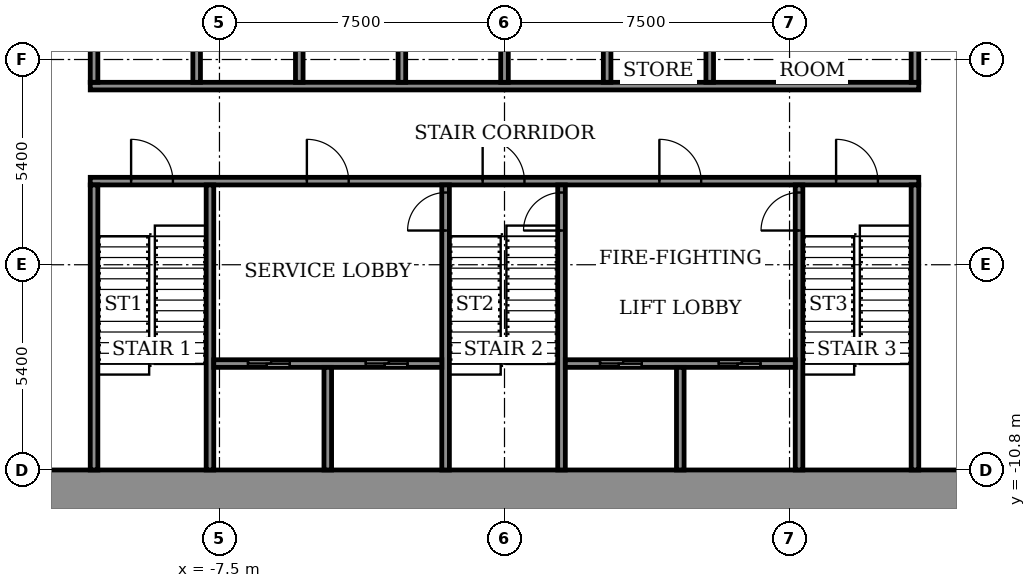
"""IFC4 building model, lengths in metres.
Left out: names, types, materials, properties, quantities, classifications, styles, units other than length and angle.
Written with IfcOpenShell. Run it as: python <this file> out.ifc"""

import sys

from ifc_helpers import new_model, si_unit, direction, frame, frame_2d, origin, place, context, subcontext, project, spatial, rectangle, extrude, element, fill, save


model = new_model("IFC4")
c1 = context("Model", 3, precision=1e-05, world=origin(), true_north=direction((0.0, 1.0)))
c2 = subcontext(c1, "Body", "Model", "MODEL_VIEW")
j1 = project(units=[si_unit("LENGTHUNIT", "METRE"), si_unit("PLANEANGLEUNIT", "RADIAN")], contexts=[c1])
p1 = place(None, origin())
s1 = spatial("IfcSite", under=j1, at=p1, CompositionType="ELEMENT")
p2 = place(p1, origin())
s2 = spatial("IfcBuilding", under=s1, at=p2, CompositionType="ELEMENT")
p3 = place(p2, frame((0.0, 0.0, 25.0)))
s3 = spatial("IfcBuildingStorey", under=s2, at=p3, CompositionType="ELEMENT", Elevation=25.0)
p4 = place(p3, frame((-15.0, -11.4, 0.0), z_axis=(0.0, 0.0, 1.0), x_axis=(1.0, 0.0, 0.0)))
e1 = element("IfcWall", 1, at=p4, inside=s3, PredefinedType="SHEAR", context=c2, shape_type="SweptSolid", body=[
    extrude(rectangle(XDim=30.0, YDim=1.2, at=frame_2d((15.0, 0.0))), origin(), (0.0, 0.0, 1.0), 4.5),
])
p5 = place(p3, frame((-10.9, -3.2, 0.0), z_axis=(0.0, 0.0, 1.0), x_axis=(1.0, 0.0, 0.0)))
e2 = element("IfcWall", 2, at=p5, inside=s3, PredefinedType="SHEAR", context=c2, shape_type="SweptSolid", body=[
    extrude(rectangle(XDim=21.8, YDim=0.2, at=frame_2d((10.9, 0.0))), origin(), (0.0, 0.0, 1.0), 3.95),
])
p6 = place(p5, frame((1.075, 0.0, 0.0)))
e3 = element("IfcOpeningElement", 3, at=p6, cuts=e2, PredefinedType="OPENING", context=c2, shape_type="SweptSolid", body=[
    extrude(rectangle(XDim=1.1, YDim=2.1, at=frame_2d((0.55, 1.05))), frame((0.0, 0.11, 0.0), z_axis=(0.0, -1.0, 0.0), x_axis=(1.0, 0.0, 0.0)), (0.0, 0.0, 1.0), 0.22),
])
p7 = place(p5, frame((10.325, 0.0, 0.0)))
e4 = element("IfcOpeningElement", 4, at=p7, cuts=e2, PredefinedType="OPENING", context=c2, shape_type="SweptSolid", body=[
    extrude(rectangle(XDim=1.1, YDim=2.1, at=frame_2d((0.55, 1.05))), frame((0.0, 0.11, 0.0), z_axis=(0.0, -1.0, 0.0), x_axis=(1.0, 0.0, 0.0)), (0.0, 0.0, 1.0), 0.22),
])
p8 = place(p5, frame((19.625, 0.0, 0.0)))
e5 = element("IfcOpeningElement", 5, at=p8, cuts=e2, PredefinedType="OPENING", context=c2, shape_type="SweptSolid", body=[
    extrude(rectangle(XDim=1.1, YDim=2.1, at=frame_2d((0.55, 1.05))), frame((0.0, 0.11, 0.0), z_axis=(0.0, -1.0, 0.0), x_axis=(1.0, 0.0, 0.0)), (0.0, 0.0, 1.0), 0.22),
])
p9 = place(p5, frame((5.7, 0.0, 0.0)))
e6 = element("IfcOpeningElement", 6, at=p9, cuts=e2, PredefinedType="OPENING", context=c2, shape_type="SweptSolid", body=[
    extrude(rectangle(XDim=1.1, YDim=2.1, at=frame_2d((0.55, 1.05))), frame((0.0, 0.11, 0.0), z_axis=(0.0, -1.0, 0.0), x_axis=(1.0, 0.0, 0.0)), (0.0, 0.0, 1.0), 0.22),
])
p10 = place(p5, frame((14.975, 0.0, 0.0)))
e7 = element("IfcOpeningElement", 7, at=p10, cuts=e2, PredefinedType="OPENING", context=c2, shape_type="SweptSolid", body=[
    extrude(rectangle(XDim=1.1, YDim=2.1, at=frame_2d((0.55, 1.05))), frame((0.0, 0.11, 0.0), z_axis=(0.0, -1.0, 0.0), x_axis=(1.0, 0.0, 0.0)), (0.0, 0.0, 1.0), 0.22),
])
p11 = place(p3, frame((-10.9, -0.7, 0.0), z_axis=(0.0, 0.0, 1.0), x_axis=(1.0, 0.0, 0.0)))
e8 = element("IfcWall", 8, at=p11, inside=s3, PredefinedType="SHEAR", context=c2, shape_type="SweptSolid", body=[
    extrude(rectangle(XDim=21.8, YDim=0.2, at=frame_2d((10.9, 0.0))), origin(), (0.0, 0.0, 1.0), 3.95),
])
for number, where, z_axis, x_axis in (
    (9, (-10.8, -10.8, 0.0), (0.0, 0.0, 1.0), (0.0, 1.0, 0.0)),
    (10, (-7.75, -10.8, 0.0), (0.0, 0.0, 1.0), (0.0, 1.0, 0.0)),
):
    element("IfcWall", number, at=place(p3, frame(where, z_axis=z_axis, x_axis=x_axis)), inside=s3, PredefinedType="SHEAR", context=c2, shape_type="SweptSolid", body=[
        extrude(rectangle(XDim=7.5, YDim=0.2, at=frame_2d((3.75, 0.0))), origin(), (0.0, 0.0, 1.0), 3.95),
    ])
p12 = place(p3, frame((-1.55, -10.8, 0.0), z_axis=(0.0, 0.0, 1.0), x_axis=(0.0, 1.0, 0.0)))
e11 = element("IfcWall", 11, at=p12, inside=s3, PredefinedType="SHEAR", context=c2, shape_type="SweptSolid", body=[
    extrude(rectangle(XDim=7.5, YDim=0.2, at=frame_2d((3.75, 0.0))), origin(), (0.0, 0.0, 1.0), 3.95),
])
p13 = place(p12, frame((6.3, 0.0, 0.0)))
e12 = element("IfcOpeningElement", 12, at=p13, cuts=e11, PredefinedType="OPENING", context=c2, shape_type="SweptSolid", body=[
    extrude(rectangle(XDim=1.0, YDim=2.1, at=frame_2d((0.5, 1.05))), frame((0.0, 0.11, 0.0), z_axis=(0.0, -1.0, 0.0), x_axis=(1.0, 0.0, 0.0)), (0.0, 0.0, 1.0), 0.22),
])
p14 = place(p3, frame((1.5, -10.8, 0.0), z_axis=(0.0, 0.0, 1.0), x_axis=(0.0, 1.0, 0.0)))
e13 = element("IfcWall", 13, at=p14, inside=s3, PredefinedType="SHEAR", context=c2, shape_type="SweptSolid", body=[
    extrude(rectangle(XDim=7.5, YDim=0.2, at=frame_2d((3.75, 0.0))), origin(), (0.0, 0.0, 1.0), 3.95),
])
p15 = place(p14, frame((6.3, 0.0, 0.0)))
e14 = element("IfcOpeningElement", 14, at=p15, cuts=e13, PredefinedType="OPENING", context=c2, shape_type="SweptSolid", body=[
    extrude(rectangle(XDim=1.0, YDim=2.1, at=frame_2d((0.5, 1.05))), frame((0.0, 0.11, 0.0), z_axis=(0.0, -1.0, 0.0), x_axis=(1.0, 0.0, 0.0)), (0.0, 0.0, 1.0), 0.22),
])
p16 = place(p3, frame((7.75, -10.8, 0.0), z_axis=(0.0, 0.0, 1.0), x_axis=(0.0, 1.0, 0.0)))
e15 = element("IfcWall", 15, at=p16, inside=s3, PredefinedType="SHEAR", context=c2, shape_type="SweptSolid", body=[
    extrude(rectangle(XDim=7.5, YDim=0.2, at=frame_2d((3.75, 0.0))), origin(), (0.0, 0.0, 1.0), 3.95),
])
p17 = place(p16, frame((6.3, 0.0, 0.0)))
e16 = element("IfcOpeningElement", 16, at=p17, cuts=e15, PredefinedType="OPENING", context=c2, shape_type="SweptSolid", body=[
    extrude(rectangle(XDim=1.0, YDim=2.1, at=frame_2d((0.5, 1.05))), frame((0.0, 0.11, 0.0), z_axis=(0.0, -1.0, 0.0), x_axis=(1.0, 0.0, 0.0)), (0.0, 0.0, 1.0), 0.22),
])
p18 = place(p3, frame((10.8, -10.8, 0.0), z_axis=(0.0, 0.0, 1.0), x_axis=(0.0, 1.0, 0.0)))
e17 = element("IfcWall", 17, at=p18, inside=s3, PredefinedType="SHEAR", context=c2, shape_type="SweptSolid", body=[
    extrude(rectangle(XDim=7.5, YDim=0.2, at=frame_2d((3.75, 0.0))), origin(), (0.0, 0.0, 1.0), 3.95),
])
p19 = place(p3, frame((-7.65, -8.0, 0.0), z_axis=(0.0, 0.0, 1.0), x_axis=(1.0, 0.0, 0.0)))
e18 = element("IfcWall", 18, at=p19, inside=s3, PredefinedType="SHEAR", context=c2, shape_type="SweptSolid", body=[
    extrude(rectangle(XDim=6.0, YDim=0.2, at=frame_2d((3.0, 0.0))), origin(), (0.0, 0.0, 1.0), 3.95),
])
p20 = place(p19, frame((0.9, 0.0, 0.0)))
e19 = element("IfcOpeningElement", 19, at=p20, cuts=e18, PredefinedType="OPENING", context=c2, shape_type="SweptSolid", body=[
    extrude(rectangle(XDim=1.1, YDim=2.1, at=frame_2d((0.55, 1.05))), frame((0.0, 0.11, 0.0), z_axis=(0.0, -1.0, 0.0), x_axis=(1.0, 0.0, 0.0)), (0.0, 0.0, 1.0), 0.22),
])
p21 = place(p19, frame((4.0, 0.0, 0.0)))
e20 = element("IfcOpeningElement", 20, at=p21, cuts=e18, PredefinedType="OPENING", context=c2, shape_type="SweptSolid", body=[
    extrude(rectangle(XDim=1.1, YDim=2.1, at=frame_2d((0.55, 1.05))), frame((0.0, 0.11, 0.0), z_axis=(0.0, -1.0, 0.0), x_axis=(1.0, 0.0, 0.0)), (0.0, 0.0, 1.0), 0.22),
])
p22 = place(p3, frame((-4.65, -10.8, 0.0), z_axis=(0.0, 0.0, 1.0), x_axis=(0.0, 1.0, 0.0)))
e21 = element("IfcWall", 21, at=p22, inside=s3, PredefinedType="SHEAR", context=c2, shape_type="SweptSolid", body=[
    extrude(rectangle(XDim=2.7, YDim=0.2, at=frame_2d((1.35, 0.0))), origin(), (0.0, 0.0, 1.0), 3.95),
])
p23 = place(p3, frame((1.6, -8.0, 0.0), z_axis=(0.0, 0.0, 1.0), x_axis=(1.0, 0.0, 0.0)))
e22 = element("IfcWall", 22, at=p23, inside=s3, PredefinedType="SHEAR", context=c2, shape_type="SweptSolid", body=[
    extrude(rectangle(XDim=6.05, YDim=0.2, at=frame_2d((3.025, 0.0))), origin(), (0.0, 0.0, 1.0), 3.95),
])
p24 = place(p23, frame((0.913, 0.0, 0.0)))
e23 = element("IfcOpeningElement", 23, at=p24, cuts=e22, PredefinedType="OPENING", context=c2, shape_type="SweptSolid", body=[
    extrude(rectangle(XDim=1.1, YDim=2.1, at=frame_2d((0.55, 1.05))), frame((0.0, 0.11, 0.0), z_axis=(0.0, -1.0, 0.0), x_axis=(1.0, 0.0, 0.0)), (0.0, 0.0, 1.0), 0.22),
])
p25 = place(p23, frame((4.038, 0.0, 0.0)))
e24 = element("IfcOpeningElement", 24, at=p25, cuts=e22, PredefinedType="OPENING", context=c2, shape_type="SweptSolid", body=[
    extrude(rectangle(XDim=1.1, YDim=2.1, at=frame_2d((0.55, 1.05))), frame((0.0, 0.11, 0.0), z_axis=(0.0, -1.0, 0.0), x_axis=(1.0, 0.0, 0.0)), (0.0, 0.0, 1.0), 0.22),
])
p26 = place(p3, frame((4.625, -10.8, 0.0), z_axis=(0.0, 0.0, 1.0), x_axis=(0.0, 1.0, 0.0)))
e25 = element("IfcWall", 25, at=p26, inside=s3, PredefinedType="SHEAR", context=c2, shape_type="SweptSolid", body=[
    extrude(rectangle(XDim=2.7, YDim=0.2, at=frame_2d((1.35, 0.0))), origin(), (0.0, 0.0, 1.0), 3.95),
])
for number, where, z_axis, x_axis in (
    (26, (-10.8, -0.6, 0.0), (0.0, 0.0, 1.0), (0.0, 1.0, 0.0)),
    (27, (-8.1, -0.6, 0.0), (0.0, 0.0, 1.0), (0.0, 1.0, 0.0)),
    (28, (-5.4, -0.6, 0.0), (0.0, 0.0, 1.0), (0.0, 1.0, 0.0)),
    (29, (-2.7, -0.6, 0.0), (0.0, 0.0, 1.0), (0.0, 1.0, 0.0)),
    (30, (0.0, -0.6, 0.0), (0.0, 0.0, 1.0), (0.0, 1.0, 0.0)),
    (31, (2.7, -0.6, 0.0), (0.0, 0.0, 1.0), (0.0, 1.0, 0.0)),
):
    element("IfcWall", number, at=place(p3, frame(where, z_axis=z_axis, x_axis=x_axis)), inside=s3, PredefinedType="SHEAR", context=c2, shape_type="SweptSolid", body=[
        extrude(rectangle(XDim=2.5, YDim=0.2, at=frame_2d((1.25, 0.0))), origin(), (0.0, 0.0, 1.0), 3.95),
    ])
for number, where, z_axis, x_axis in (
    (32, (5.4, -0.6, 0.0), (0.0, 0.0, 1.0), (0.0, 1.0, 0.0)),
    (33, (10.8, -0.6, 0.0), (0.0, 0.0, 1.0), (0.0, 1.0, 0.0)),
):
    element("IfcWall", number, at=place(p3, frame(where, z_axis=z_axis, x_axis=x_axis)), inside=s3, PredefinedType="STANDARD", context=c2, shape_type="SweptSolid", body=[
        extrude(rectangle(XDim=2.5, YDim=0.2, at=frame_2d((1.25, 0.0))), origin(), (0.0, 0.0, 1.0), 3.95),
    ])
p27 = place(p24, origin())
e34 = element("IfcDoor", 34, at=p27, inside=s3, OperationType="SLIDING_TO_LEFT", PredefinedType="DOOR", context=c2, shape_type="SweptSolid", body=[
    extrude(rectangle(XDim=1.1, YDim=2.1, at=frame_2d((0.55, 1.05))), frame((0.0, 0.025, 0.0), z_axis=(0.0, -1.0, 0.0), x_axis=(1.0, 0.0, 0.0)), (0.0, 0.0, 1.0), 0.05),
])
fill(e23, e34)
p28 = place(p20, origin())
e35 = element("IfcDoor", 35, at=p28, inside=s3, OperationType="SLIDING_TO_LEFT", PredefinedType="DOOR", context=c2, shape_type="SweptSolid", body=[
    extrude(rectangle(XDim=1.1, YDim=2.1, at=frame_2d((0.55, 1.05))), frame((0.0, 0.025, 0.0), z_axis=(0.0, -1.0, 0.0), x_axis=(1.0, 0.0, 0.0)), (0.0, 0.0, 1.0), 0.05),
])
fill(e19, e35)
p29 = place(p25, origin())
e36 = element("IfcDoor", 36, at=p29, inside=s3, OperationType="SLIDING_TO_LEFT", PredefinedType="DOOR", context=c2, shape_type="SweptSolid", body=[
    extrude(rectangle(XDim=1.1, YDim=2.1, at=frame_2d((0.55, 1.05))), frame((0.0, 0.025, 0.0), z_axis=(0.0, -1.0, 0.0), x_axis=(1.0, 0.0, 0.0)), (0.0, 0.0, 1.0), 0.05),
])
fill(e24, e36)
p30 = place(p21, origin())
e37 = element("IfcDoor", 37, at=p30, inside=s3, OperationType="SLIDING_TO_LEFT", PredefinedType="DOOR", context=c2, shape_type="SweptSolid", body=[
    extrude(rectangle(XDim=1.1, YDim=2.1, at=frame_2d((0.55, 1.05))), frame((0.0, 0.025, 0.0), z_axis=(0.0, -1.0, 0.0), x_axis=(1.0, 0.0, 0.0)), (0.0, 0.0, 1.0), 0.05),
])
fill(e20, e37)
p31 = place(p6, origin())
e38 = element("IfcDoor", 38, at=p31, inside=s3, OperationType="SINGLE_SWING_RIGHT", PredefinedType="DOOR", context=c2, shape_type="SweptSolid", body=[
    extrude(rectangle(XDim=1.1, YDim=2.1, at=frame_2d((0.55, 1.05))), frame((0.0, 0.025, 0.0), z_axis=(0.0, -1.0, 0.0), x_axis=(1.0, 0.0, 0.0)), (0.0, 0.0, 1.0), 0.05),
])
fill(e3, e38)
p32 = place(p7, origin())
e39 = element("IfcDoor", 39, at=p32, inside=s3, OperationType="SINGLE_SWING_RIGHT", PredefinedType="DOOR", context=c2, shape_type="SweptSolid", body=[
    extrude(rectangle(XDim=1.1, YDim=2.1, at=frame_2d((0.55, 1.05))), frame((0.0, 0.025, 0.0), z_axis=(0.0, -1.0, 0.0), x_axis=(1.0, 0.0, 0.0)), (0.0, 0.0, 1.0), 0.05),
])
fill(e4, e39)
p33 = place(p8, origin())
e40 = element("IfcDoor", 40, at=p33, inside=s3, OperationType="SINGLE_SWING_RIGHT", PredefinedType="DOOR", context=c2, shape_type="SweptSolid", body=[
    extrude(rectangle(XDim=1.1, YDim=2.1, at=frame_2d((0.55, 1.05))), frame((0.0, 0.025, 0.0), z_axis=(0.0, -1.0, 0.0), x_axis=(1.0, 0.0, 0.0)), (0.0, 0.0, 1.0), 0.05),
])
fill(e5, e40)
p34 = place(p9, origin())
e41 = element("IfcDoor", 41, at=p34, inside=s3, OperationType="SINGLE_SWING_LEFT", PredefinedType="DOOR", context=c2, shape_type="SweptSolid", body=[
    extrude(rectangle(XDim=1.1, YDim=2.1, at=frame_2d((0.55, 1.05))), frame((0.0, 0.025, 0.0), z_axis=(0.0, -1.0, 0.0), x_axis=(1.0, 0.0, 0.0)), (0.0, 0.0, 1.0), 0.05),
])
fill(e6, e41)
p35 = place(p10, origin())
e42 = element("IfcDoor", 42, at=p35, inside=s3, OperationType="SINGLE_SWING_LEFT", PredefinedType="DOOR", context=c2, shape_type="SweptSolid", body=[
    extrude(rectangle(XDim=1.1, YDim=2.1, at=frame_2d((0.55, 1.05))), frame((0.0, 0.025, 0.0), z_axis=(0.0, -1.0, 0.0), x_axis=(1.0, 0.0, 0.0)), (0.0, 0.0, 1.0), 0.05),
])
fill(e7, e42)
p36 = place(p13, origin())
e43 = element("IfcDoor", 43, at=p36, inside=s3, OperationType="SINGLE_SWING_RIGHT", PredefinedType="DOOR", context=c2, shape_type="SweptSolid", body=[
    extrude(rectangle(XDim=1.0, YDim=2.1, at=frame_2d((0.5, 1.05))), frame((0.0, 0.025, 0.0), z_axis=(0.0, -1.0, 0.0), x_axis=(1.0, 0.0, 0.0)), (0.0, 0.0, 1.0), 0.05),
])
fill(e12, e43)
p37 = place(p15, origin())
e44 = element("IfcDoor", 44, at=p37, inside=s3, OperationType="SINGLE_SWING_RIGHT", PredefinedType="DOOR", context=c2, shape_type="SweptSolid", body=[
    extrude(rectangle(XDim=1.0, YDim=2.1, at=frame_2d((0.5, 1.05))), frame((0.0, 0.025, 0.0), z_axis=(0.0, -1.0, 0.0), x_axis=(1.0, 0.0, 0.0)), (0.0, 0.0, 1.0), 0.05),
])
fill(e14, e44)
p38 = place(p17, origin())
e45 = element("IfcDoor", 45, at=p38, inside=s3, OperationType="SINGLE_SWING_RIGHT", PredefinedType="DOOR", context=c2, shape_type="SweptSolid", body=[
    extrude(rectangle(XDim=1.0, YDim=2.1, at=frame_2d((0.5, 1.05))), frame((0.0, 0.025, 0.0), z_axis=(0.0, -1.0, 0.0), x_axis=(1.0, 0.0, 0.0)), (0.0, 0.0, 1.0), 0.05),
])
fill(e16, e45)
save(model, sys.argv[1])
